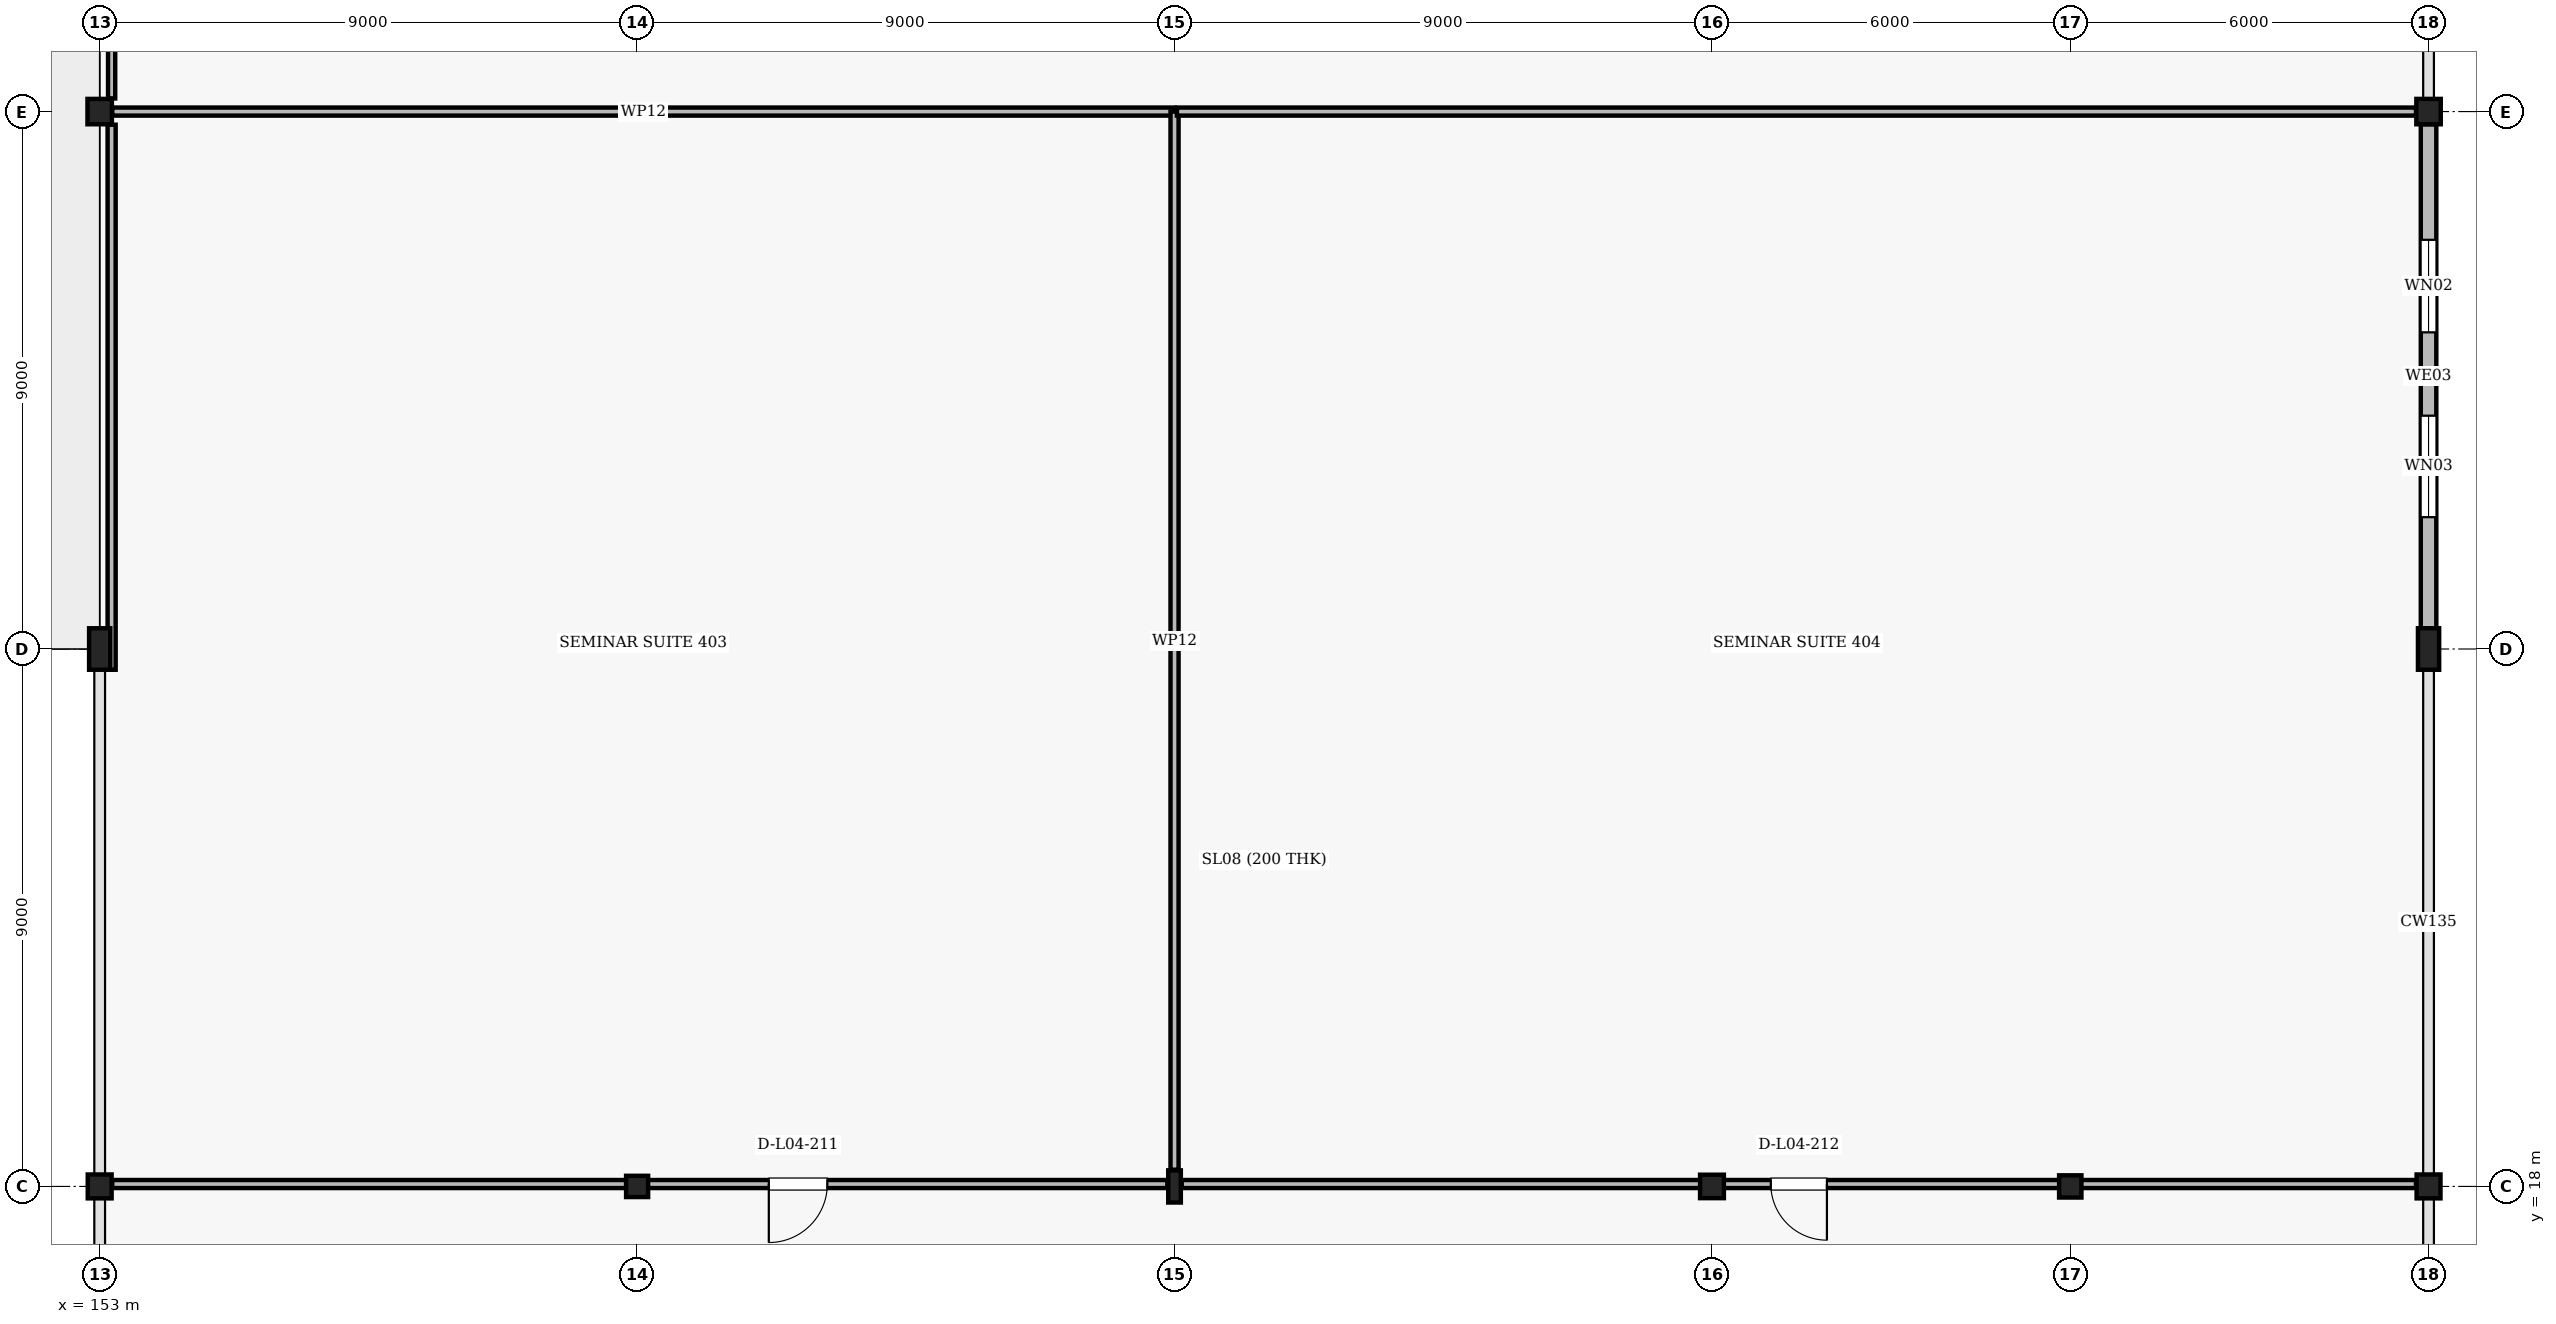
"""IFC4 building model, lengths in metres.
Left out: names, types, materials, properties, quantities, classifications, styles, units other than length and angle.
Written with IfcOpenShell. Run it as: python <this file> out.ifc"""

import sys

from ifc_helpers import new_model, si_unit, direction, frame, frame_2d, origin, origin_2d, place, context, subcontext, project, spatial, rectangle, hollow_rectangle, i_section, extrude, element, fill, save


model = new_model("IFC4")
c1 = context("Model", 3, precision=1e-05, world=origin(), true_north=direction((0.0, 1.0)))
c2 = subcontext(c1, "Body", "Model", "MODEL_VIEW")
j1 = project(units=[si_unit("LENGTHUNIT", "METRE"), si_unit("PLANEANGLEUNIT", "RADIAN")], contexts=[c1])
p1 = place(None, origin())
s1 = spatial("IfcSite", under=j1, at=p1, CompositionType="ELEMENT")
p2 = place(p1, origin())
s2 = spatial("IfcBuilding", under=s1, at=p2, CompositionType="ELEMENT")
p3 = place(p2, frame((0.0, 0.0, 20.4)))
s3 = spatial("IfcBuildingStorey", under=s2, at=p3, CompositionType="ELEMENT", Elevation=20.4)
p4 = place(p3, frame((153.0, 18.0, 0.0), z_axis=(0.0, 0.0, 1.0), x_axis=(1.0, 0.0, 0.0)))
e1 = element("IfcColumn", 1, at=p4, inside=s3, PredefinedType="COLUMN", context=c2, shape_type="SweptSolid", body=[
    extrude(hollow_rectangle(XDim=0.4, YDim=0.4, WallThickness=0.016, InnerFilletRadius=0.016, OuterFilletRadius=0.032, at=origin_2d()), origin(), (0.0, 0.0, 1.0), 4.8),
])
p5 = place(p3, frame((153.0, 27.0, 0.0), z_axis=(0.0, 0.0, 1.0), x_axis=(1.0, 0.0, 0.0)))
e2 = element("IfcColumn", 2, at=p5, inside=s3, PredefinedType="COLUMN", context=c2, shape_type="SweptSolid", body=[
    extrude(i_section(OverallWidth=0.355, OverallDepth=0.695, WebThickness=0.015, FlangeThickness=0.025, FilletRadius=0.018, at=origin_2d()), origin(), (0.0, 0.0, 1.0), 4.8),
])
p6 = place(p3, frame((153.0, 36.0, 0.0), z_axis=(0.0, 0.0, 1.0), x_axis=(1.0, 0.0, 0.0)))
e3 = element("IfcColumn", 3, at=p6, inside=s3, PredefinedType="COLUMN", context=c2, shape_type="SweptSolid", body=[
    extrude(i_section(OverallWidth=0.409, OverallDepth=0.425, WebThickness=0.031, FlangeThickness=0.049, FilletRadius=0.02, at=origin_2d()), origin(), (0.0, 0.0, 1.0), 4.8),
])
p7 = place(p3, frame((162.0, 18.0, 0.0), z_axis=(0.0, 0.0, 1.0), x_axis=(1.0, 0.0, 0.0)))
e4 = element("IfcColumn", 4, at=p7, inside=s3, PredefinedType="COLUMN", context=c2, shape_type="SweptSolid", body=[
    extrude(i_section(OverallWidth=0.369, OverallDepth=0.356, WebThickness=0.011, FlangeThickness=0.018, FilletRadius=0.015, at=origin_2d()), origin(), (0.0, 0.0, 1.0), 4.8),
])
p8 = place(p3, frame((171.0, 18.0, 0.0), z_axis=(0.0, 0.0, 1.0), x_axis=(1.0, 0.0, 0.0)))
e5 = element("IfcColumn", 5, at=p8, inside=s3, PredefinedType="COLUMN", context=c2, shape_type="SweptSolid", body=[
    extrude(i_section(OverallWidth=0.211, OverallDepth=0.539, WebThickness=0.012, FlangeThickness=0.019, FilletRadius=0.014, at=origin_2d()), origin(), (0.0, 0.0, 1.0), 4.8),
])
p9 = place(p3, frame((180.0, 18.0, 0.0), z_axis=(0.0, 0.0, 1.0), x_axis=(1.0, 0.0, 0.0)))
e6 = element("IfcColumn", 6, at=p9, inside=s3, PredefinedType="COLUMN", context=c2, shape_type="SweptSolid", body=[
    extrude(i_section(OverallWidth=0.399, OverallDepth=0.393, WebThickness=0.023, FlangeThickness=0.037, FilletRadius=0.018, at=origin_2d()), origin(), (0.0, 0.0, 1.0), 4.8),
])
p10 = place(p3, frame((186.0, 18.0, 0.0), z_axis=(0.0, 0.0, 1.0), x_axis=(1.0, 0.0, 0.0)))
e7 = element("IfcColumn", 7, at=p10, inside=s3, PredefinedType="COLUMN", context=c2, shape_type="SweptSolid", body=[
    extrude(i_section(OverallWidth=0.374, OverallDepth=0.372, WebThickness=0.016, FlangeThickness=0.026, FilletRadius=0.016, at=origin_2d()), origin(), (0.0, 0.0, 1.0), 4.8),
])
p11 = place(p3, frame((192.0, 18.0, 0.0), z_axis=(0.0, 0.0, 1.0), x_axis=(1.0, 0.0, 0.0)))
e8 = element("IfcColumn", 8, at=p11, inside=s3, PredefinedType="COLUMN", context=c2, shape_type="SweptSolid", body=[
    extrude(hollow_rectangle(XDim=0.4, YDim=0.4, WallThickness=0.016, InnerFilletRadius=0.016, OuterFilletRadius=0.032, at=origin_2d()), origin(), (0.0, 0.0, 1.0), 4.8),
])
p12 = place(p3, frame((192.0, 27.0, 0.0), z_axis=(0.0, 0.0, 1.0), x_axis=(1.0, 0.0, 0.0)))
e9 = element("IfcColumn", 9, at=p12, inside=s3, PredefinedType="COLUMN", context=c2, shape_type="SweptSolid", body=[
    extrude(i_section(OverallWidth=0.355, OverallDepth=0.695, WebThickness=0.015, FlangeThickness=0.025, FilletRadius=0.018, at=origin_2d()), origin(), (0.0, 0.0, 1.0), 4.8),
])
p13 = place(p3, frame((192.0, 36.0, 0.0), z_axis=(0.0, 0.0, 1.0), x_axis=(1.0, 0.0, 0.0)))
e10 = element("IfcColumn", 10, at=p13, inside=s3, PredefinedType="COLUMN", context=c2, shape_type="SweptSolid", body=[
    extrude(i_section(OverallWidth=0.409, OverallDepth=0.425, WebThickness=0.031, FlangeThickness=0.049, FilletRadius=0.02, at=origin_2d()), origin(), (0.0, 0.0, 1.0), 4.8),
])
p14 = place(p3, frame((192.0, 35.788, 0.0), z_axis=(0.0, 0.0, 1.0), x_axis=(0.0, -1.0, 0.0)))
e11 = element("IfcWall", 11, at=p14, inside=s3, PredefinedType="SOLIDWALL", context=c2, shape_type="SweptSolid", body=[
    extrude(rectangle(XDim=8.44, YDim=0.26, at=frame_2d((4.22, 0.0))), origin(), (0.0, 0.0, 1.0), 4.245),
])
p15 = place(p14, frame((1.935, 0.0, 0.95)))
e12 = element("IfcOpeningElement", 12, at=p15, cuts=e11, PredefinedType="OPENING", context=c2, shape_type="SweptSolid", body=[
    extrude(rectangle(XDim=1.55, YDim=1.75, at=frame_2d((0.775, 0.875))), frame((0.0, 0.14, 0.0), z_axis=(0.0, -1.0, 0.0), x_axis=(1.0, 0.0, 0.0)), (0.0, 0.0, 1.0), 0.28),
])
p16 = place(p14, frame((4.88, 0.0, 0.95)))
e13 = element("IfcOpeningElement", 13, at=p16, cuts=e11, PredefinedType="OPENING", context=c2, shape_type="SweptSolid", body=[
    extrude(rectangle(XDim=1.7, YDim=1.8, at=frame_2d((0.85, 0.9))), frame((0.0, 0.14, 0.0), z_axis=(0.0, -1.0, 0.0), x_axis=(1.0, 0.0, 0.0)), (0.0, 0.0, 1.0), 0.28),
])
p17 = place(p3, frame((153.21, 36.0, 0.0), z_axis=(0.0, 0.0, 1.0), x_axis=(1.0, 0.0, 0.0)))
e14 = element("IfcWall", 14, at=p17, inside=s3, PredefinedType="PARTITIONING", context=c2, shape_type="SweptSolid", body=[
    extrude(rectangle(XDim=17.79, YDim=0.135, at=frame_2d((8.895, 0.0))), origin(), (0.0, 0.0, 1.0), 3.69),
])
p18 = place(p3, frame((171.0, 36.0, 0.0), z_axis=(0.0, 0.0, 1.0), x_axis=(0.0, -1.0, 0.0)))
e15 = element("IfcWall", 15, at=p18, inside=s3, PredefinedType="PARTITIONING", context=c2, shape_type="SweptSolid", body=[
    extrude(rectangle(XDim=17.72, YDim=0.135, at=frame_2d((8.86, 0.0))), origin(), (0.0, 0.0, 1.0), 3.69),
])
p19 = place(p3, frame((170.88, 18.04, 0.0), z_axis=(0.0, 0.0, 1.0), x_axis=(-1.0, 0.0, 0.0)))
e16 = element("IfcWall", 16, at=p19, inside=s3, PredefinedType="PARTITIONING", context=c2, shape_type="SweptSolid", body=[
    extrude(rectangle(XDim=17.67, YDim=0.135, at=frame_2d((8.835, 0.0))), origin(), (0.0, 0.0, 1.0), 3.69),
])
p20 = place(p19, frame((5.695, 0.0, 0.0)))
e17 = element("IfcOpeningElement", 17, at=p20, cuts=e16, PredefinedType="OPENING", context=c2, shape_type="SweptSolid", body=[
    extrude(rectangle(XDim=0.98, YDim=2.15, at=frame_2d((0.49, 1.075))), frame((0.0, 0.078, 0.0), z_axis=(0.0, -1.0, 0.0), x_axis=(1.0, 0.0, 0.0)), (0.0, 0.0, 1.0), 0.155),
])
p21 = place(p3, frame((153.2, 26.653, 0.0), z_axis=(0.0, 0.0, 1.0), x_axis=(0.0, 1.0, 0.0)))
e18 = element("IfcWall", 18, at=p21, inside=s3, PredefinedType="PARTITIONING", context=c2, shape_type="SweptSolid", body=[
    extrude(rectangle(XDim=9.127, YDim=0.135, at=frame_2d((4.564, 0.0))), origin(), (0.0, 0.0, 1.0), 3.69),
])
p22 = place(p3, frame((191.79, 18.04, 0.0), z_axis=(0.0, 0.0, 1.0), x_axis=(-1.0, 0.0, 0.0)))
e19 = element("IfcWall", 19, at=p22, inside=s3, PredefinedType="PARTITIONING", context=c2, shape_type="SweptSolid", body=[
    extrude(rectangle(XDim=20.67, YDim=0.135, at=frame_2d((10.335, 0.0))), origin(), (0.0, 0.0, 1.0), 3.69),
])
p23 = place(p22, frame((9.865, 0.0, 0.0)))
e20 = element("IfcOpeningElement", 20, at=p23, cuts=e19, PredefinedType="OPENING", context=c2, shape_type="SweptSolid", body=[
    extrude(rectangle(XDim=0.94, YDim=2.15, at=frame_2d((0.47, 1.075))), frame((0.0, 0.078, 0.0), z_axis=(0.0, -1.0, 0.0), x_axis=(1.0, 0.0, 0.0)), (0.0, 0.0, 1.0), 0.155),
])
p24 = place(p3, frame((171.04, 36.0, 0.0), z_axis=(0.0, 0.0, 1.0), x_axis=(1.0, 0.0, 0.0)))
e21 = element("IfcWall", 21, at=p24, inside=s3, PredefinedType="PARTITIONING", context=c2, shape_type="SweptSolid", body=[
    extrude(rectangle(XDim=20.75, YDim=0.135, at=frame_2d((10.375, 0.0))), origin(), (0.0, 0.0, 1.0), 3.69),
])
p25 = place(p3, frame((153.2, 36.22, 0.0), z_axis=(0.0, 0.0, 1.0), x_axis=(0.0, 1.0, 0.0)))
e22 = element("IfcWall", 22, at=p25, inside=s3, PredefinedType="PARTITIONING", context=c2, shape_type="SweptSolid", body=[
    extrude(rectangle(XDim=9.33, YDim=0.12, at=frame_2d((4.665, 0.0))), origin(), (0.0, 0.0, 1.0), 3.69),
])
p26 = place(p15, origin())
e23 = element("IfcWindow", 23, at=p26, inside=s3, PartitioningType="SINGLE_PANEL", PredefinedType="WINDOW", context=c2, shape_type="SweptSolid", body=[
    extrude(rectangle(XDim=1.55, YDim=1.75, at=frame_2d((0.775, 0.875))), frame((0.0, 0.03, 0.0), z_axis=(0.0, -1.0, 0.0), x_axis=(1.0, 0.0, 0.0)), (0.0, 0.0, 1.0), 0.06),
])
fill(e12, e23)
p27 = place(p16, origin())
e24 = element("IfcWindow", 24, at=p27, inside=s3, PartitioningType="SINGLE_PANEL", PredefinedType="WINDOW", context=c2, shape_type="SweptSolid", body=[
    extrude(rectangle(XDim=1.7, YDim=1.8, at=frame_2d((0.85, 0.9))), frame((0.0, 0.03, 0.0), z_axis=(0.0, -1.0, 0.0), x_axis=(1.0, 0.0, 0.0)), (0.0, 0.0, 1.0), 0.06),
])
fill(e13, e24)
p28 = place(p20, origin())
e25 = element("IfcDoor", 25, at=p28, inside=s3, OperationType="SINGLE_SWING_RIGHT", PredefinedType="DOOR", context=c2, shape_type="SweptSolid", body=[
    extrude(rectangle(XDim=0.98, YDim=2.15, at=frame_2d((0.49, 1.075))), frame((0.0, 0.025, 0.0), z_axis=(0.0, -1.0, 0.0), x_axis=(1.0, 0.0, 0.0)), (0.0, 0.0, 1.0), 0.05),
])
fill(e17, e25)
p29 = place(p23, origin())
e26 = element("IfcDoor", 26, at=p29, inside=s3, OperationType="SINGLE_SWING_LEFT", PredefinedType="DOOR", context=c2, shape_type="SweptSolid", body=[
    extrude(rectangle(XDim=0.94, YDim=2.15, at=frame_2d((0.47, 1.075))), frame((0.0, 0.025, 0.0), z_axis=(0.0, -1.0, 0.0), x_axis=(1.0, 0.0, 0.0)), (0.0, 0.0, 1.0), 0.05),
])
fill(e20, e26)
save(model, sys.argv[1])
